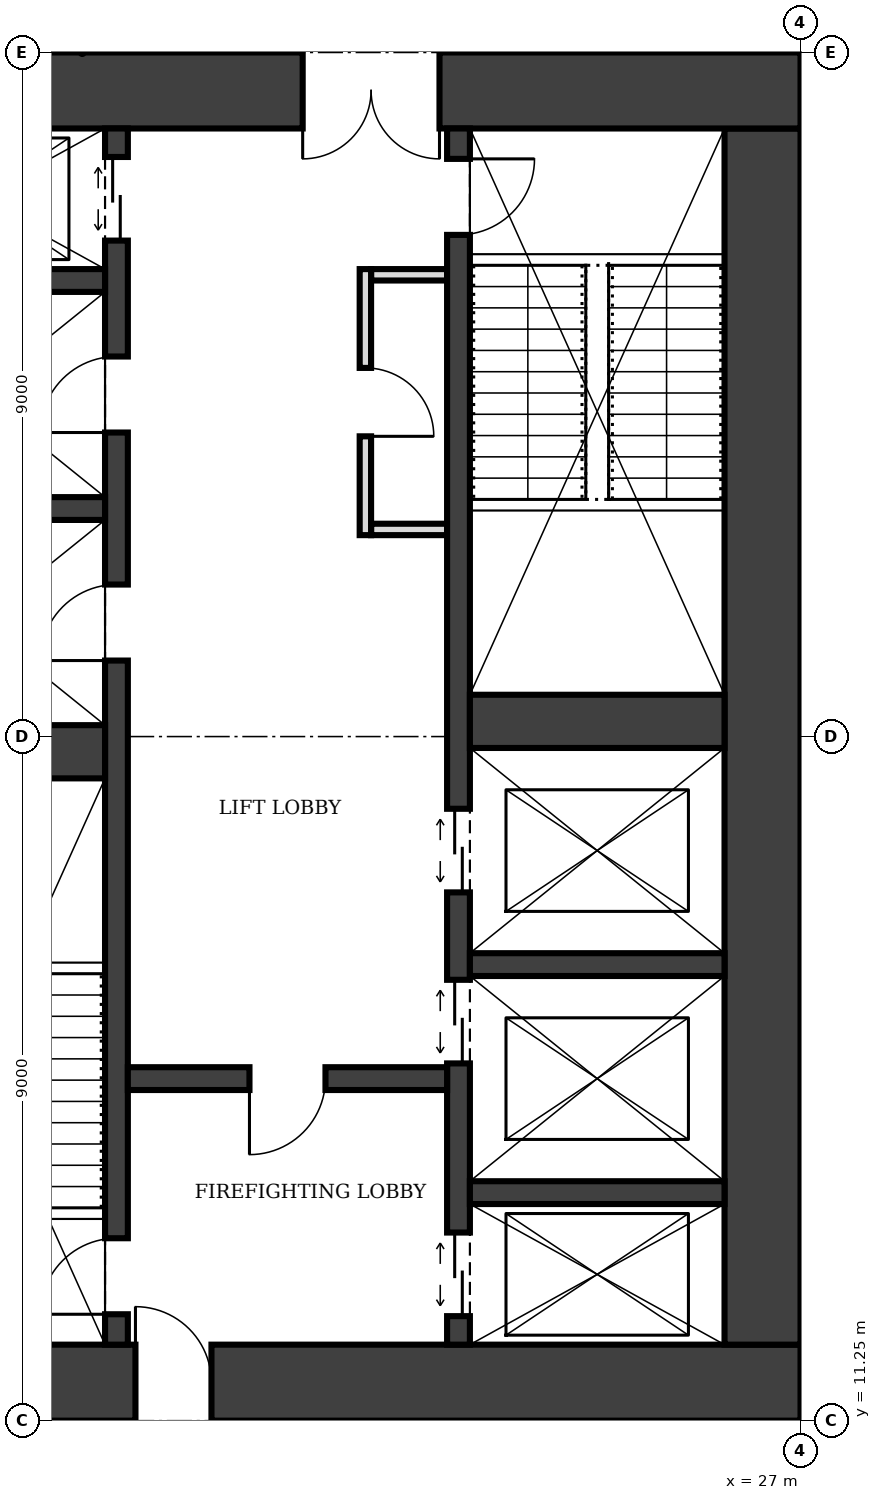
"""IFC4 building model, lengths in metres.
Left out: names, types, materials, properties, quantities, classifications, styles, units other than length and angle.
Written with IfcOpenShell. Run it as: python <this file> out.ifc"""

import sys

from ifc_helpers import new_model, si_unit, direction, frame, frame_2d, origin, place, context, subcontext, project, spatial, rectangle, extrude, element, fill, save


model = new_model("IFC4")
c1 = context("Model", 3, precision=1e-05, world=origin(), true_north=direction((0.0, 1.0)))
c2 = subcontext(c1, "Body", "Model", "MODEL_VIEW")
j1 = project(units=[si_unit("LENGTHUNIT", "METRE"), si_unit("PLANEANGLEUNIT", "RADIAN")], contexts=[c1])
p1 = place(None, origin())
s1 = spatial("IfcSite", under=j1, at=p1, CompositionType="ELEMENT")
p2 = place(p1, origin())
s2 = spatial("IfcBuilding", under=s1, at=p2, CompositionType="ELEMENT")
p3 = place(p2, frame((0.0, 0.0, 261.0)))
s3 = spatial("IfcBuildingStorey", under=s2, at=p3, CompositionType="ELEMENT", Elevation=261.0)
p4 = place(p3, frame((13.5, 11.75, 0.0), z_axis=(0.0, 0.0, 1.0), x_axis=(1.0, 0.0, 0.0)))
e1 = element("IfcWall", 1, at=p4, inside=s3, PredefinedType="SHEAR", context=c2, shape_type="SweptSolid", body=[
    extrude(rectangle(XDim=13.5, YDim=1.0, at=frame_2d((6.75, 0.0))), origin(), (0.0, 0.0, 1.0), 4.0),
])
p5 = place(p4, frame((4.75, 0.0, 0.0)))
e2 = element("IfcOpeningElement", 2, at=p5, cuts=e1, PredefinedType="OPENING", context=c2, shape_type="SweptSolid", body=[
    extrude(rectangle(XDim=1.0, YDim=2.1, at=frame_2d((0.5, 1.05))), frame((0.0, 0.51, 0.0), z_axis=(0.0, -1.0, 0.0), x_axis=(1.0, 0.0, 0.0)), (0.0, 0.0, 1.0), 1.02),
])
p6 = place(p3, frame((26.5, 12.25, 0.0), z_axis=(0.0, 0.0, 1.0), x_axis=(0.0, 1.0, 0.0)))
e3 = element("IfcWall", 3, at=p6, inside=s3, PredefinedType="SHEAR", context=c2, shape_type="SweptSolid", body=[
    extrude(rectangle(XDim=16.0, YDim=1.0, at=frame_2d((8.0, 0.0))), origin(), (0.0, 0.0, 1.0), 4.0),
])
p7 = place(p3, frame((27.0, 28.75, 0.0), z_axis=(0.0, 0.0, 1.0), x_axis=(-1.0, 0.0, 0.0)))
e4 = element("IfcWall", 4, at=p7, inside=s3, PredefinedType="SHEAR", context=c2, shape_type="SweptSolid", body=[
    extrude(rectangle(XDim=13.5, YDim=1.0, at=frame_2d((6.75, 0.0))), origin(), (0.0, 0.0, 1.0), 4.0),
])
p8 = place(p7, frame((4.75, 0.0, 0.0)))
e5 = element("IfcOpeningElement", 5, at=p8, cuts=e4, PredefinedType="OPENING", context=c2, shape_type="SweptSolid", body=[
    extrude(rectangle(XDim=1.8, YDim=2.1, at=frame_2d((0.9, 1.05))), frame((0.0, 0.51, 0.0), z_axis=(0.0, -1.0, 0.0), x_axis=(1.0, 0.0, 0.0)), (0.0, 0.0, 1.0), 1.02),
])
p9 = place(p3, frame((18.0, 12.25, 0.0), z_axis=(0.0, 0.0, 1.0), x_axis=(0.0, 1.0, 0.0)))
e6 = element("IfcWall", 6, at=p9, inside=s3, PredefinedType="SHEAR", context=c2, shape_type="SweptSolid", body=[
    extrude(rectangle(XDim=16.0, YDim=0.3, at=frame_2d((8.0, 0.0))), origin(), (0.0, 0.0, 1.0), 4.0),
])
p10 = place(p9, frame((0.4, 0.0, 0.0)))
e7 = element("IfcOpeningElement", 7, at=p10, cuts=e6, PredefinedType="OPENING", context=c2, shape_type="SweptSolid", body=[
    extrude(rectangle(XDim=1.0, YDim=2.1, at=frame_2d((0.5, 1.05))), frame((0.0, 0.16, 0.0), z_axis=(0.0, -1.0, 0.0), x_axis=(1.0, 0.0, 0.0)), (0.0, 0.0, 1.0), 0.32),
])
p11 = place(p9, frame((14.525, 0.0, 0.0)))
e8 = element("IfcOpeningElement", 8, at=p11, cuts=e6, PredefinedType="OPENING", context=c2, shape_type="SweptSolid", body=[
    extrude(rectangle(XDim=1.1, YDim=2.1, at=frame_2d((0.55, 1.05))), frame((0.0, 0.16, 0.0), z_axis=(0.0, -1.0, 0.0), x_axis=(1.0, 0.0, 0.0)), (0.0, 0.0, 1.0), 0.32),
])
p12 = place(p9, frame((9.0, 0.0, 0.0)))
e9 = element("IfcOpeningElement", 9, at=p12, cuts=e6, PredefinedType="OPENING", context=c2, shape_type="SweptSolid", body=[
    extrude(rectangle(XDim=1.0, YDim=2.1, at=frame_2d((0.5, 1.05))), frame((0.0, 0.16, 0.0), z_axis=(0.0, -1.0, 0.0), x_axis=(1.0, 0.0, 0.0)), (0.0, 0.0, 1.0), 0.32),
])
p13 = place(p9, frame((12.0, 0.0, 0.0)))
e10 = element("IfcOpeningElement", 10, at=p13, cuts=e6, PredefinedType="OPENING", context=c2, shape_type="SweptSolid", body=[
    extrude(rectangle(XDim=1.0, YDim=2.1, at=frame_2d((0.5, 1.05))), frame((0.0, 0.16, 0.0), z_axis=(0.0, -1.0, 0.0), x_axis=(1.0, 0.0, 0.0)), (0.0, 0.0, 1.0), 0.32),
])
p14 = place(p3, frame((22.5, 12.25, 0.0), z_axis=(0.0, 0.0, 1.0), x_axis=(0.0, 1.0, 0.0)))
e11 = element("IfcWall", 11, at=p14, inside=s3, PredefinedType="SHEAR", context=c2, shape_type="SweptSolid", body=[
    extrude(rectangle(XDim=16.0, YDim=0.3, at=frame_2d((8.0, 0.0))), origin(), (0.0, 0.0, 1.0), 4.0),
])
p15 = place(p14, frame((14.6, 0.0, 0.0)))
e12 = element("IfcOpeningElement", 12, at=p15, cuts=e11, PredefinedType="OPENING", context=c2, shape_type="SweptSolid", body=[
    extrude(rectangle(XDim=1.0, YDim=2.1, at=frame_2d((0.5, 1.05))), frame((0.0, 0.16, 0.0), z_axis=(0.0, -1.0, 0.0), x_axis=(1.0, 0.0, 0.0)), (0.0, 0.0, 1.0), 0.32),
])
p16 = place(p14, frame((0.375, 0.0, 0.0)))
e13 = element("IfcOpeningElement", 13, at=p16, cuts=e11, PredefinedType="OPENING", context=c2, shape_type="SweptSolid", body=[
    extrude(rectangle(XDim=1.1, YDim=2.1, at=frame_2d((0.55, 1.05))), frame((0.0, 0.16, 0.0), z_axis=(0.0, -1.0, 0.0), x_axis=(1.0, 0.0, 0.0)), (0.0, 0.0, 1.0), 0.32),
])
p17 = place(p14, frame((3.7, 0.0, 0.0)))
e14 = element("IfcOpeningElement", 14, at=p17, cuts=e11, PredefinedType="OPENING", context=c2, shape_type="SweptSolid", body=[
    extrude(rectangle(XDim=1.1, YDim=2.1, at=frame_2d((0.55, 1.05))), frame((0.0, 0.16, 0.0), z_axis=(0.0, -1.0, 0.0), x_axis=(1.0, 0.0, 0.0)), (0.0, 0.0, 1.0), 0.32),
])
p18 = place(p14, frame((5.95, 0.0, 0.0)))
e15 = element("IfcOpeningElement", 15, at=p18, cuts=e11, PredefinedType="OPENING", context=c2, shape_type="SweptSolid", body=[
    extrude(rectangle(XDim=1.1, YDim=2.1, at=frame_2d((0.55, 1.05))), frame((0.0, 0.16, 0.0), z_axis=(0.0, -1.0, 0.0), x_axis=(1.0, 0.0, 0.0)), (0.0, 0.0, 1.0), 0.32),
])
p19 = place(p3, frame((14.5, 20.05, 0.0), z_axis=(0.0, 0.0, 1.0), x_axis=(1.0, 0.0, 0.0)))
e16 = element("IfcWall", 16, at=p19, inside=s3, PredefinedType="SHEAR", context=c2, shape_type="SweptSolid", body=[
    extrude(rectangle(XDim=3.35, YDim=0.7, at=frame_2d((1.675, 0.0))), origin(), (0.0, 0.0, 1.0), 4.0),
])
p20 = place(p3, frame((18.15, 15.75, 0.0), z_axis=(0.0, 0.0, 1.0), x_axis=(1.0, 0.0, 0.0)))
e17 = element("IfcWall", 17, at=p20, inside=s3, PredefinedType="SHEAR", context=c2, shape_type="SweptSolid", body=[
    extrude(rectangle(XDim=4.2, YDim=0.3, at=frame_2d((2.1, 0.0))), origin(), (0.0, 0.0, 1.0), 4.0),
])
p21 = place(p20, frame((1.6, 0.0, 0.0)))
e18 = element("IfcOpeningElement", 18, at=p21, cuts=e17, PredefinedType="OPENING", context=c2, shape_type="SweptSolid", body=[
    extrude(rectangle(XDim=1.0, YDim=2.1, at=frame_2d((0.5, 1.05))), frame((0.0, 0.16, 0.0), z_axis=(0.0, -1.0, 0.0), x_axis=(1.0, 0.0, 0.0)), (0.0, 0.0, 1.0), 0.32),
])
for number, where, z_axis, x_axis in (
    (19, (22.65, 14.25, 0.0), (0.0, 0.0, 1.0), (1.0, 0.0, 0.0)),
    (20, (22.65, 17.25, 0.0), (0.0, 0.0, 1.0), (1.0, 0.0, 0.0)),
):
    element("IfcWall", number, at=place(p3, frame(where, z_axis=z_axis, x_axis=x_axis)), inside=s3, PredefinedType="SHEAR", context=c2, shape_type="SweptSolid", body=[
        extrude(rectangle(XDim=3.35, YDim=0.3, at=frame_2d((1.675, 0.0))), origin(), (0.0, 0.0, 1.0), 4.0),
    ])
p22 = place(p3, frame((22.65, 20.45, 0.0), z_axis=(0.0, 0.0, 1.0), x_axis=(1.0, 0.0, 0.0)))
e21 = element("IfcWall", 21, at=p22, inside=s3, PredefinedType="SHEAR", context=c2, shape_type="SweptSolid", body=[
    extrude(rectangle(XDim=3.35, YDim=0.7, at=frame_2d((1.675, 0.0))), origin(), (0.0, 0.0, 1.0), 4.0),
])
for number, where, z_axis, x_axis in (
    (22, (14.5, 23.25, 0.0), (0.0, 0.0, 1.0), (1.0, 0.0, 0.0)),
    (23, (14.5, 26.25, 0.0), (0.0, 0.0, 1.0), (1.0, 0.0, 0.0)),
):
    element("IfcWall", number, at=place(p3, frame(where, z_axis=z_axis, x_axis=x_axis)), inside=s3, PredefinedType="SHEAR", context=c2, shape_type="SweptSolid", body=[
        extrude(rectangle(XDim=3.35, YDim=0.3, at=frame_2d((1.675, 0.0))), origin(), (0.0, 0.0, 1.0), 4.0),
    ])
p23 = place(p3, frame((21.275, 22.9, 0.0), z_axis=(0.0, 0.0, 1.0), x_axis=(0.0, 1.0, 0.0)))
e24 = element("IfcWall", 24, at=p23, inside=s3, PredefinedType="PARTITIONING", context=c2, shape_type="SweptSolid", body=[
    extrude(rectangle(XDim=3.5, YDim=0.15, at=frame_2d((1.75, 0.0))), origin(), (0.0, 0.0, 1.0), 3.75),
])
p24 = place(p23, frame((1.3, 0.0, 0.0)))
e25 = element("IfcOpeningElement", 25, at=p24, cuts=e24, PredefinedType="OPENING", context=c2, shape_type="SweptSolid", body=[
    extrude(rectangle(XDim=0.9, YDim=2.1, at=frame_2d((0.45, 1.05))), frame((0.0, 0.085, 0.0), z_axis=(0.0, -1.0, 0.0), x_axis=(1.0, 0.0, 0.0)), (0.0, 0.0, 1.0), 0.17),
])
for number, where, z_axis, x_axis in (
    (26, (21.35, 22.975, 0.0), (0.0, 0.0, 1.0), (1.0, 0.0, 0.0)),
    (27, (21.35, 26.325, 0.0), (0.0, 0.0, 1.0), (1.0, 0.0, 0.0)),
):
    element("IfcWall", number, at=place(p3, frame(where, z_axis=z_axis, x_axis=x_axis)), inside=s3, PredefinedType="PARTITIONING", context=c2, shape_type="SweptSolid", body=[
        extrude(rectangle(XDim=1.0, YDim=0.15, at=frame_2d((0.5, 0.0))), origin(), (0.0, 0.0, 1.0), 3.75),
    ])
p25 = place(p5, origin())
e28 = element("IfcDoor", 28, at=p25, inside=s3, OperationType="SINGLE_SWING_LEFT", PredefinedType="DOOR", context=c2, shape_type="SweptSolid", body=[
    extrude(rectangle(XDim=1.0, YDim=2.1, at=frame_2d((0.5, 1.05))), frame((0.0, 0.025, 0.0), z_axis=(0.0, -1.0, 0.0), x_axis=(1.0, 0.0, 0.0)), (0.0, 0.0, 1.0), 0.05),
])
fill(e2, e28)
p26 = place(p8, origin())
e29 = element("IfcDoor", 29, at=p26, inside=s3, OperationType="DOUBLE_DOOR_SINGLE_SWING", PredefinedType="DOOR", context=c2, shape_type="SweptSolid", body=[
    extrude(rectangle(XDim=1.8, YDim=2.1, at=frame_2d((0.9, 1.05))), frame((0.0, 0.025, 0.0), z_axis=(0.0, -1.0, 0.0), x_axis=(1.0, 0.0, 0.0)), (0.0, 0.0, 1.0), 0.05),
])
fill(e5, e29)
p27 = place(p21, frame((1.0, 0.0, 0.0), z_axis=(0.0, 0.0, 1.0), x_axis=(-1.0, 0.0, 0.0)))
e30 = element("IfcDoor", 30, at=p27, inside=s3, OperationType="SINGLE_SWING_RIGHT", PredefinedType="DOOR", context=c2, shape_type="SweptSolid", body=[
    extrude(rectangle(XDim=1.0, YDim=2.1, at=frame_2d((0.5, 1.05))), frame((0.0, 0.025, 0.0), z_axis=(0.0, -1.0, 0.0), x_axis=(1.0, 0.0, 0.0)), (0.0, 0.0, 1.0), 0.05),
])
fill(e18, e30)
p28 = place(p10, origin())
e31 = element("IfcDoor", 31, at=p28, inside=s3, OperationType="SINGLE_SWING_LEFT", PredefinedType="DOOR", context=c2, shape_type="SweptSolid", body=[
    extrude(rectangle(XDim=1.0, YDim=2.1, at=frame_2d((0.5, 1.05))), frame((0.0, 0.025, 0.0), z_axis=(0.0, -1.0, 0.0), x_axis=(1.0, 0.0, 0.0)), (0.0, 0.0, 1.0), 0.05),
])
fill(e7, e31)
p29 = place(p15, frame((1.0, 0.0, 0.0), z_axis=(0.0, 0.0, 1.0), x_axis=(-1.0, 0.0, 0.0)))
e32 = element("IfcDoor", 32, at=p29, inside=s3, OperationType="SINGLE_SWING_LEFT", PredefinedType="DOOR", context=c2, shape_type="SweptSolid", body=[
    extrude(rectangle(XDim=1.0, YDim=2.1, at=frame_2d((0.5, 1.05))), frame((0.0, 0.025, 0.0), z_axis=(0.0, -1.0, 0.0), x_axis=(1.0, 0.0, 0.0)), (0.0, 0.0, 1.0), 0.05),
])
fill(e12, e32)
p30 = place(p16, origin())
e33 = element("IfcDoor", 33, at=p30, inside=s3, OperationType="DOUBLE_DOOR_SLIDING", PredefinedType="DOOR", context=c2, shape_type="SweptSolid", body=[
    extrude(rectangle(XDim=1.1, YDim=2.1, at=frame_2d((0.55, 1.05))), frame((0.0, 0.025, 0.0), z_axis=(0.0, -1.0, 0.0), x_axis=(1.0, 0.0, 0.0)), (0.0, 0.0, 1.0), 0.05),
])
fill(e13, e33)
p31 = place(p11, origin())
e34 = element("IfcDoor", 34, at=p31, inside=s3, OperationType="DOUBLE_DOOR_SLIDING", PredefinedType="DOOR", context=c2, shape_type="SweptSolid", body=[
    extrude(rectangle(XDim=1.1, YDim=2.1, at=frame_2d((0.55, 1.05))), frame((0.0, 0.025, 0.0), z_axis=(0.0, -1.0, 0.0), x_axis=(1.0, 0.0, 0.0)), (0.0, 0.0, 1.0), 0.05),
])
fill(e8, e34)
p32 = place(p17, origin())
e35 = element("IfcDoor", 35, at=p32, inside=s3, OperationType="DOUBLE_DOOR_SLIDING", PredefinedType="DOOR", context=c2, shape_type="SweptSolid", body=[
    extrude(rectangle(XDim=1.1, YDim=2.1, at=frame_2d((0.55, 1.05))), frame((0.0, 0.025, 0.0), z_axis=(0.0, -1.0, 0.0), x_axis=(1.0, 0.0, 0.0)), (0.0, 0.0, 1.0), 0.05),
])
fill(e14, e35)
p33 = place(p18, origin())
e36 = element("IfcDoor", 36, at=p33, inside=s3, OperationType="DOUBLE_DOOR_SLIDING", PredefinedType="DOOR", context=c2, shape_type="SweptSolid", body=[
    extrude(rectangle(XDim=1.1, YDim=2.1, at=frame_2d((0.55, 1.05))), frame((0.0, 0.025, 0.0), z_axis=(0.0, -1.0, 0.0), x_axis=(1.0, 0.0, 0.0)), (0.0, 0.0, 1.0), 0.05),
])
fill(e15, e36)
p34 = place(p24, frame((0.9, 0.0, 0.0), z_axis=(0.0, 0.0, 1.0), x_axis=(-1.0, 0.0, 0.0)))
e37 = element("IfcDoor", 37, at=p34, inside=s3, OperationType="SINGLE_SWING_RIGHT", PredefinedType="DOOR", context=c2, shape_type="SweptSolid", body=[
    extrude(rectangle(XDim=0.9, YDim=2.1, at=frame_2d((0.45, 1.05))), frame((0.0, 0.025, 0.0), z_axis=(0.0, -1.0, 0.0), x_axis=(1.0, 0.0, 0.0)), (0.0, 0.0, 1.0), 0.05),
])
fill(e25, e37)
p35 = place(p12, origin())
e38 = element("IfcDoor", 38, at=p35, inside=s3, OperationType="SINGLE_SWING_LEFT", PredefinedType="DOOR", context=c2, shape_type="SweptSolid", body=[
    extrude(rectangle(XDim=1.0, YDim=2.1, at=frame_2d((0.5, 1.05))), frame((0.0, 0.025, 0.0), z_axis=(0.0, -1.0, 0.0), x_axis=(1.0, 0.0, 0.0)), (0.0, 0.0, 1.0), 0.05),
])
fill(e9, e38)
p36 = place(p13, origin())
e39 = element("IfcDoor", 39, at=p36, inside=s3, OperationType="SINGLE_SWING_LEFT", PredefinedType="DOOR", context=c2, shape_type="SweptSolid", body=[
    extrude(rectangle(XDim=1.0, YDim=2.1, at=frame_2d((0.5, 1.05))), frame((0.0, 0.025, 0.0), z_axis=(0.0, -1.0, 0.0), x_axis=(1.0, 0.0, 0.0)), (0.0, 0.0, 1.0), 0.05),
])
fill(e10, e39)
save(model, sys.argv[1])
